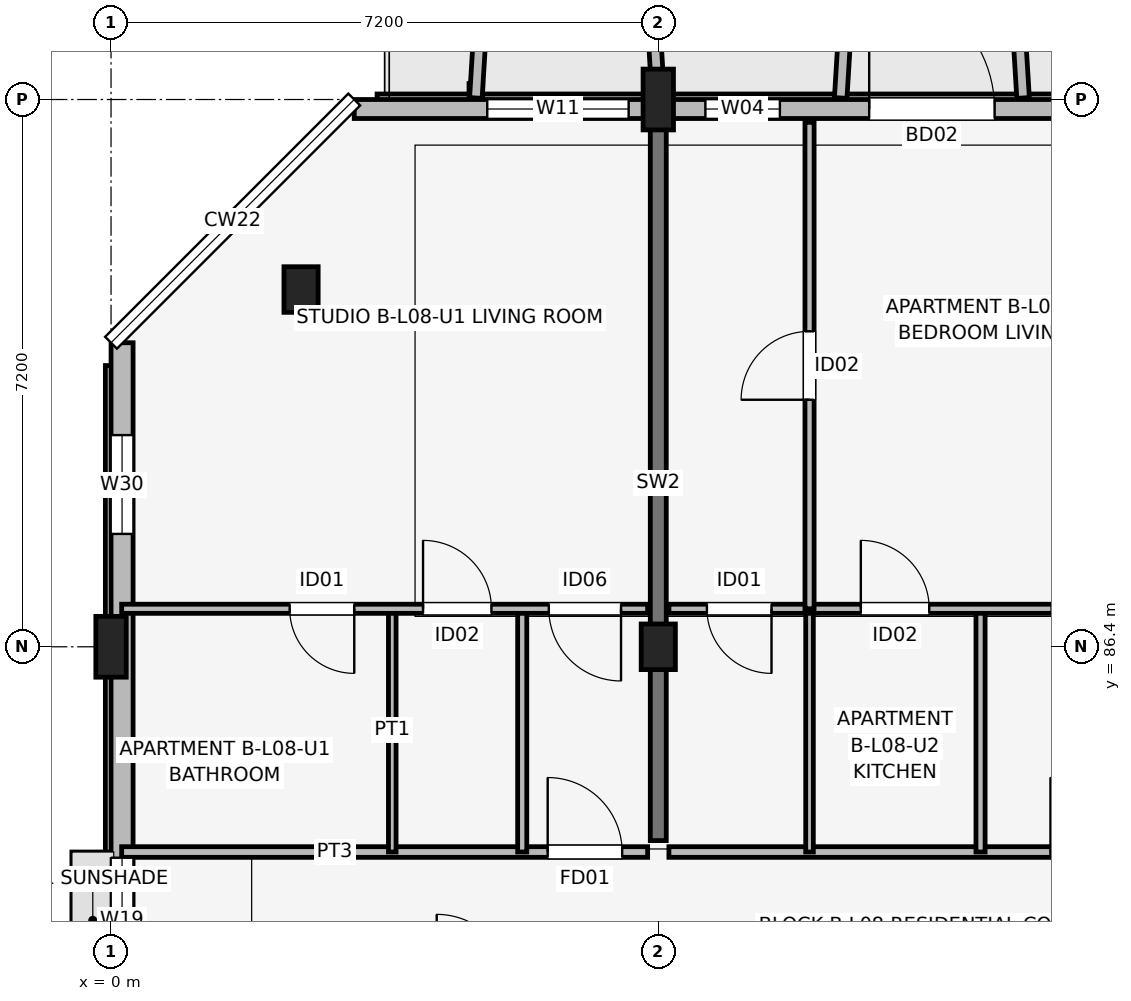
"""IFC4 building model, lengths in metres.
Left out: names, types, materials, properties, quantities, classifications, styles, units other than length and angle.
Written with IfcOpenShell. Run it as: python <this file> out.ifc"""

import sys

from ifc_helpers import new_model, si_unit, direction, frame, frame_2d, origin, origin_2d, place, context, subcontext, project, spatial, rectangle, extrude, element, fill, save


model = new_model("IFC4")
c1 = context("Model", 3, precision=1e-05, world=origin(), true_north=direction((0.0, 1.0)))
c2 = subcontext(c1, "Body", "Model", "MODEL_VIEW")
j1 = project(units=[si_unit("LENGTHUNIT", "METRE"), si_unit("PLANEANGLEUNIT", "RADIAN")], contexts=[c1])
p1 = place(None, origin())
s1 = spatial("IfcSite", under=j1, at=p1, CompositionType="ELEMENT")
p2 = place(p1, origin())
s2 = spatial("IfcBuilding", under=s1, at=p2, CompositionType="ELEMENT")
p3 = place(p2, frame((0.0, 0.0, 27.6)))
s3 = spatial("IfcBuildingStorey", under=s2, at=p3, CompositionType="ELEMENT", Elevation=27.6)
p4 = place(p3, frame((0.0, 86.4, 0.0), z_axis=(0.0, 0.0, 1.0), x_axis=(1.0, 0.0, 0.0)))
e1 = element("IfcColumn", 1, at=p4, inside=s3, PredefinedType="COLUMN", context=c2, shape_type="SweptSolid", body=[
    extrude(rectangle(XDim=0.4, YDim=0.8, at=origin_2d()), origin(), (0.0, 0.0, 1.0), 3.15),
])
for number, where, z_axis, x_axis in (
    (2, (2.5, 91.1, 0.0), (0.0, 0.0, 1.0), (1.0, 0.0, 0.0)),
    (3, (7.2, 86.4, 0.0), (0.0, 0.0, 1.0), (1.0, 0.0, 0.0)),
):
    element("IfcColumn", number, at=place(p3, frame(where, z_axis=z_axis, x_axis=x_axis)), inside=s3, PredefinedType="COLUMN", context=c2, shape_type="SweptSolid", body=[
        extrude(rectangle(XDim=0.45, YDim=0.6, at=origin_2d()), origin(), (0.0, 0.0, 1.0), 3.15),
    ])
p5 = place(p3, frame((7.2, 93.6, 0.0), z_axis=(0.0, 0.0, 1.0), x_axis=(1.0, 0.0, 0.0)))
e4 = element("IfcColumn", 4, at=p5, inside=s3, PredefinedType="COLUMN", context=c2, shape_type="SweptSolid", body=[
    extrude(rectangle(XDim=0.4, YDim=0.8, at=origin_2d()), origin(), (0.0, 0.0, 1.0), 3.15),
])
p6 = place(p3, frame((7.2, 83.85, 0.0), z_axis=(0.0, 0.0, 1.0), x_axis=(0.0, 1.0, 0.0)))
e5 = element("IfcWall", 5, at=p6, inside=s3, PredefinedType="SHEAR", context=c2, shape_type="SweptSolid", body=[
    extrude(rectangle(XDim=9.4, YDim=0.21, at=frame_2d((4.7, 0.0))), origin(), (0.0, 0.0, 1.0), 3.15),
])
p7 = place(p3, frame((32.8, 93.475, 0.0), z_axis=(0.0, 0.0, 1.0), x_axis=(-1.0, 0.0, 0.0)))
e6 = element("IfcWall", 6, at=p7, inside=s3, PredefinedType="SOLIDWALL", context=c2, shape_type="SweptSolid", body=[
    extrude(rectangle(XDim=29.6, YDim=0.25, at=frame_2d((14.8, 0.0))), origin(), (0.0, 0.0, 1.0), 2.43),
])
p8 = place(p7, frame((22.825, 0.0, 0.0), z_axis=(0.0, 0.0, 1.0), x_axis=(-1.0, 0.0, 0.0)))
e7 = element("IfcOpeningElement", 7, at=p8, cuts=e6, PredefinedType="OPENING", context=c2, shape_type="SweptSolid", body=[
    extrude(rectangle(XDim=1.65, YDim=2.15, at=frame_2d((0.825, 1.075))), frame((0.0, 0.135, 0.0), z_axis=(0.0, -1.0, 0.0), x_axis=(1.0, 0.0, 0.0)), (0.0, 0.0, 1.0), 0.27),
])
p9 = place(p7, frame((8.35, 0.0, 0.0), z_axis=(0.0, 0.0, 1.0), x_axis=(-1.0, 0.0, 0.0)))
e8 = element("IfcOpeningElement", 8, at=p9, cuts=e6, PredefinedType="OPENING", context=c2, shape_type="SweptSolid", body=[
    extrude(rectangle(XDim=1.5, YDim=2.15, at=frame_2d((0.75, 1.075))), frame((0.0, 0.135, 0.0), z_axis=(0.0, -1.0, 0.0), x_axis=(1.0, 0.0, 0.0)), (0.0, 0.0, 1.0), 0.27),
])
p10 = place(p7, frame((25.99, 0.0, 0.7)))
e9 = element("IfcOpeningElement", 9, at=p10, cuts=e6, PredefinedType="OPENING", context=c2, shape_type="SweptSolid", body=[
    extrude(rectangle(XDim=1.86, YDim=1.6, at=frame_2d((0.93, 0.8))), frame((0.0, 0.135, 0.0), z_axis=(0.0, -1.0, 0.0), x_axis=(1.0, 0.0, 0.0)), (0.0, 0.0, 1.0), 0.27),
])
p11 = place(p7, frame((24.0, 0.0, 0.75)))
e10 = element("IfcOpeningElement", 10, at=p11, cuts=e6, PredefinedType="OPENING", context=c2, shape_type="SweptSolid", body=[
    extrude(rectangle(XDim=0.98, YDim=1.45, at=frame_2d((0.49, 0.725))), frame((0.0, 0.135, 0.0), z_axis=(0.0, -1.0, 0.0), x_axis=(1.0, 0.0, 0.0)), (0.0, 0.0, 1.0), 0.27),
])
p12 = place(p7, frame((16.15, 0.0, 0.7)))
e11 = element("IfcOpeningElement", 11, at=p12, cuts=e6, PredefinedType="OPENING", context=c2, shape_type="SweptSolid", body=[
    extrude(rectangle(XDim=1.86, YDim=1.6, at=frame_2d((0.93, 0.8))), frame((0.0, 0.135, 0.0), z_axis=(0.0, -1.0, 0.0), x_axis=(1.0, 0.0, 0.0)), (0.0, 0.0, 1.0), 0.27),
])
p13 = place(p7, frame((11.91, 0.0, 0.75)))
e12 = element("IfcOpeningElement", 12, at=p13, cuts=e6, PredefinedType="OPENING", context=c2, shape_type="SweptSolid", body=[
    extrude(rectangle(XDim=1.22, YDim=1.5, at=frame_2d((0.61, 0.75))), frame((0.0, 0.135, 0.0), z_axis=(0.0, -1.0, 0.0), x_axis=(1.0, 0.0, 0.0)), (0.0, 0.0, 1.0), 0.27),
])
p14 = place(p7, frame((9.42, 0.0, 0.75)))
e13 = element("IfcOpeningElement", 13, at=p14, cuts=e6, PredefinedType="OPENING", context=c2, shape_type="SweptSolid", body=[
    extrude(rectangle(XDim=1.34, YDim=1.55, at=frame_2d((0.67, 0.775))), frame((0.0, 0.135, 0.0), z_axis=(0.0, -1.0, 0.0), x_axis=(1.0, 0.0, 0.0)), (0.0, 0.0, 1.0), 0.27),
])
p15 = place(p7, frame((2.16, 0.0, 0.75)))
e14 = element("IfcOpeningElement", 14, at=p15, cuts=e6, PredefinedType="OPENING", context=c2, shape_type="SweptSolid", body=[
    extrude(rectangle(XDim=1.46, YDim=1.55, at=frame_2d((0.73, 0.775))), frame((0.0, 0.135, 0.0), z_axis=(0.0, -1.0, 0.0), x_axis=(1.0, 0.0, 0.0)), (0.0, 0.0, 1.0), 0.27),
])
p16 = place(p7, frame((0.585, 0.0, 0.75)))
e15 = element("IfcOpeningElement", 15, at=p16, cuts=e6, PredefinedType="OPENING", context=c2, shape_type="SweptSolid", body=[
    extrude(rectangle(XDim=0.6, YDim=1.25, at=frame_2d((0.3, 0.625))), frame((0.0, 0.135, 0.0), z_axis=(0.0, -1.0, 0.0), x_axis=(1.0, 0.0, 0.0)), (0.0, 0.0, 1.0), 0.27),
])
p17 = place(p3, frame((0.145, 90.4, 0.0), z_axis=(0.0, 0.0, 1.0), x_axis=(0.0, -1.0, 0.0)))
e16 = element("IfcWall", 16, at=p17, inside=s3, PredefinedType="SOLIDWALL", context=c2, shape_type="SweptSolid", body=[
    extrude(rectangle(XDim=15.2, YDim=0.29, at=frame_2d((7.6, 0.0))), origin(), (0.0, 0.0, 1.0), 2.43),
])
p18 = place(p17, frame((6.775, 0.0, 1.05)))
e17 = element("IfcOpeningElement", 17, at=p18, cuts=e16, PredefinedType="OPENING", context=c2, shape_type="SweptSolid", body=[
    extrude(rectangle(XDim=1.65, YDim=1.15, at=frame_2d((0.825, 0.575))), frame((0.0, 0.155, 0.0), z_axis=(0.0, -1.0, 0.0), x_axis=(1.0, 0.0, 0.0)), (0.0, 0.0, 1.0), 0.31),
])
p19 = place(p17, frame((1.215, 0.0, 0.75)))
e18 = element("IfcOpeningElement", 18, at=p19, cuts=e16, PredefinedType="OPENING", context=c2, shape_type="SweptSolid", body=[
    extrude(rectangle(XDim=1.3, YDim=1.55, at=frame_2d((0.65, 0.775))), frame((0.0, 0.155, 0.0), z_axis=(0.0, -1.0, 0.0), x_axis=(1.0, 0.0, 0.0)), (0.0, 0.0, 1.0), 0.31),
])
for number, where, z_axis, x_axis in (
    (19, (4.8, 93.62, 0.0), (0.0, 0.0, 1.0), (0.061, 0.998, 0.0)),
    (20, (7.2, 93.62, 0.0), (0.0, 0.0, 1.0), (-0.061, 0.998, 0.0)),
):
    element("IfcWall", number, at=place(p3, frame(where, z_axis=z_axis, x_axis=x_axis)), inside=s3, PredefinedType="ELEMENTEDWALL", context=c2, shape_type="SweptSolid", body=[
        extrude(rectangle(XDim=1.964, YDim=0.165, at=frame_2d((0.982, 0.0))), origin(), (0.0, 0.0, 1.0), 2.95),
    ])
for number, where, z_axis, x_axis in (
    (21, (9.6, 93.62, 0.0), (0.0, 0.0, 1.0), (0.061, 0.998, 0.0)),
    (22, (12.0, 93.62, 0.0), (0.0, 0.0, 1.0), (-0.061, 0.998, 0.0)),
):
    element("IfcWall", number, at=place(p3, frame(where, z_axis=z_axis, x_axis=x_axis)), inside=s3, PredefinedType="ELEMENTEDWALL", context=c2, shape_type="SweptSolid", body=[
        extrude(rectangle(XDim=1.964, YDim=0.165, at=frame_2d((0.982, 0.0))), origin(), (0.0, 0.0, 1.0), 2.55),
    ])
p20 = place(p3, frame((0.14, 83.7, 0.0), z_axis=(0.0, 0.0, 1.0), x_axis=(1.0, 0.0, 0.0)))
e23 = element("IfcWall", 23, at=p20, inside=s3, PredefinedType="PARTITIONING", context=c2, shape_type="SweptSolid", body=[
    extrude(rectangle(XDim=6.92, YDim=0.14, at=frame_2d((3.46, 0.0))), origin(), (0.0, 0.0, 1.0), 2.38),
])
p21 = place(p20, frame((5.605, 0.0, 0.0)))
e24 = element("IfcOpeningElement", 24, at=p21, cuts=e23, PredefinedType="OPENING", context=c2, shape_type="SweptSolid", body=[
    extrude(rectangle(XDim=0.98, YDim=2.1, at=frame_2d((0.49, 1.05))), frame((0.0, 0.08, 0.0), z_axis=(0.0, -1.0, 0.0), x_axis=(1.0, 0.0, 0.0)), (0.0, 0.0, 1.0), 0.16),
])
p22 = place(p3, frame((3.7, 83.7, 0.0), z_axis=(0.0, 0.0, 1.0), x_axis=(0.0, 1.0, 0.0)))
e25 = element("IfcWall", 25, at=p22, inside=s3, PredefinedType="PARTITIONING", context=c2, shape_type="SweptSolid", body=[
    extrude(rectangle(XDim=3.2, YDim=0.1, at=frame_2d((1.6, 0.0))), origin(), (0.0, 0.0, 1.0), 2.38),
])
p23 = place(p3, frame((5.41, 83.7, 0.0), z_axis=(0.0, 0.0, 1.0), x_axis=(0.0, 1.0, 0.0)))
e26 = element("IfcWall", 26, at=p23, inside=s3, PredefinedType="PARTITIONING", context=c2, shape_type="SweptSolid", body=[
    extrude(rectangle(XDim=3.2, YDim=0.12, at=frame_2d((1.6, 0.0))), origin(), (0.0, 0.0, 1.0), 2.38),
])
p24 = place(p3, frame((0.14, 86.9, 0.0), z_axis=(0.0, 0.0, 1.0), x_axis=(1.0, 0.0, 0.0)))
e27 = element("IfcWall", 27, at=p24, inside=s3, PredefinedType="PARTITIONING", context=c2, shape_type="SweptSolid", body=[
    extrude(rectangle(XDim=6.92, YDim=0.12, at=frame_2d((3.46, 0.0))), origin(), (0.0, 0.0, 1.0), 2.38),
])
p25 = place(p24, frame((3.06, 0.0, 0.0), z_axis=(0.0, 0.0, 1.0), x_axis=(-1.0, 0.0, 0.0)))
e28 = element("IfcOpeningElement", 28, at=p25, cuts=e27, PredefinedType="OPENING", context=c2, shape_type="SweptSolid", body=[
    extrude(rectangle(XDim=0.85, YDim=2.08, at=frame_2d((0.425, 1.04))), frame((0.0, 0.07, 0.0), z_axis=(0.0, -1.0, 0.0), x_axis=(1.0, 0.0, 0.0)), (0.0, 0.0, 1.0), 0.14),
])
p26 = place(p24, frame((3.965, 0.0, 0.0)))
e29 = element("IfcOpeningElement", 29, at=p26, cuts=e27, PredefinedType="OPENING", context=c2, shape_type="SweptSolid", body=[
    extrude(rectangle(XDim=0.9, YDim=2.08, at=frame_2d((0.45, 1.04))), frame((0.0, 0.07, 0.0), z_axis=(0.0, -1.0, 0.0), x_axis=(1.0, 0.0, 0.0)), (0.0, 0.0, 1.0), 0.14),
])
p27 = place(p24, frame((6.57, 0.0, 0.0), z_axis=(0.0, 0.0, 1.0), x_axis=(-1.0, 0.0, 0.0)))
e30 = element("IfcOpeningElement", 30, at=p27, cuts=e27, PredefinedType="OPENING", context=c2, shape_type="SweptSolid", body=[
    extrude(rectangle(XDim=0.95, YDim=2.08, at=frame_2d((0.475, 1.04))), frame((0.0, 0.07, 0.0), z_axis=(0.0, -1.0, 0.0), x_axis=(1.0, 0.0, 0.0)), (0.0, 0.0, 1.0), 0.14),
])
p28 = place(p3, frame((7.34, 83.7, 0.0), z_axis=(0.0, 0.0, 1.0), x_axis=(1.0, 0.0, 0.0)))
e31 = element("IfcWall", 31, at=p28, inside=s3, PredefinedType="PARTITIONING", context=c2, shape_type="SweptSolid", body=[
    extrude(rectangle(XDim=6.92, YDim=0.14, at=frame_2d((3.46, 0.0))), origin(), (0.0, 0.0, 1.0), 2.38),
])
p29 = place(p28, frame((5.02, 0.0, 0.0)))
e32 = element("IfcOpeningElement", 32, at=p29, cuts=e31, PredefinedType="OPENING", context=c2, shape_type="SweptSolid", body=[
    extrude(rectangle(XDim=0.98, YDim=2.1, at=frame_2d((0.49, 1.05))), frame((0.0, 0.08, 0.0), z_axis=(0.0, -1.0, 0.0), x_axis=(1.0, 0.0, 0.0)), (0.0, 0.0, 1.0), 0.16),
])
p30 = place(p3, frame((9.19, 83.7, 0.0), z_axis=(0.0, 0.0, 1.0), x_axis=(0.0, 1.0, 0.0)))
e33 = element("IfcWall", 33, at=p30, inside=s3, PredefinedType="PARTITIONING", context=c2, shape_type="SweptSolid", body=[
    extrude(rectangle(XDim=3.2, YDim=0.1, at=frame_2d((1.6, 0.0))), origin(), (0.0, 0.0, 1.0), 2.38),
])
p31 = place(p3, frame((11.44, 83.7, 0.0), z_axis=(0.0, 0.0, 1.0), x_axis=(0.0, 1.0, 0.0)))
e34 = element("IfcWall", 34, at=p31, inside=s3, PredefinedType="PARTITIONING", context=c2, shape_type="SweptSolid", body=[
    extrude(rectangle(XDim=3.2, YDim=0.12, at=frame_2d((1.6, 0.0))), origin(), (0.0, 0.0, 1.0), 2.38),
])
p32 = place(p3, frame((7.34, 86.9, 0.0), z_axis=(0.0, 0.0, 1.0), x_axis=(1.0, 0.0, 0.0)))
e35 = element("IfcWall", 35, at=p32, inside=s3, PredefinedType="PARTITIONING", context=c2, shape_type="SweptSolid", body=[
    extrude(rectangle(XDim=6.92, YDim=0.12, at=frame_2d((3.46, 0.0))), origin(), (0.0, 0.0, 1.0), 2.38),
])
p33 = place(p32, frame((1.35, 0.0, 0.0), z_axis=(0.0, 0.0, 1.0), x_axis=(-1.0, 0.0, 0.0)))
e36 = element("IfcOpeningElement", 36, at=p33, cuts=e35, PredefinedType="OPENING", context=c2, shape_type="SweptSolid", body=[
    extrude(rectangle(XDim=0.85, YDim=2.08, at=frame_2d((0.425, 1.04))), frame((0.0, 0.07, 0.0), z_axis=(0.0, -1.0, 0.0), x_axis=(1.0, 0.0, 0.0)), (0.0, 0.0, 1.0), 0.14),
])
p34 = place(p32, frame((2.525, 0.0, 0.0)))
e37 = element("IfcOpeningElement", 37, at=p34, cuts=e35, PredefinedType="OPENING", context=c2, shape_type="SweptSolid", body=[
    extrude(rectangle(XDim=0.9, YDim=2.08, at=frame_2d((0.45, 1.04))), frame((0.0, 0.07, 0.0), z_axis=(0.0, -1.0, 0.0), x_axis=(1.0, 0.0, 0.0)), (0.0, 0.0, 1.0), 0.14),
])
p35 = place(p32, frame((5.985, 0.0, 0.0), z_axis=(0.0, 0.0, 1.0), x_axis=(-1.0, 0.0, 0.0)))
e38 = element("IfcOpeningElement", 38, at=p35, cuts=e35, PredefinedType="OPENING", context=c2, shape_type="SweptSolid", body=[
    extrude(rectangle(XDim=0.95, YDim=2.08, at=frame_2d((0.475, 1.04))), frame((0.0, 0.07, 0.0), z_axis=(0.0, -1.0, 0.0), x_axis=(1.0, 0.0, 0.0)), (0.0, 0.0, 1.0), 0.14),
])
p36 = place(p3, frame((9.19, 86.9, 0.0), z_axis=(0.0, 0.0, 1.0), x_axis=(0.0, 1.0, 0.0)))
e39 = element("IfcWall", 39, at=p36, inside=s3, PredefinedType="PARTITIONING", context=c2, shape_type="SweptSolid", body=[
    extrude(rectangle(XDim=6.4, YDim=0.12, at=frame_2d((3.2, 0.0))), origin(), (0.0, 0.0, 1.0), 2.38),
])
p37 = place(p36, frame((2.75, 0.0, 0.0)))
e40 = element("IfcOpeningElement", 40, at=p37, cuts=e39, PredefinedType="OPENING", context=c2, shape_type="SweptSolid", body=[
    extrude(rectangle(XDim=0.9, YDim=2.08, at=frame_2d((0.45, 1.04))), frame((0.0, 0.07, 0.0), z_axis=(0.0, -1.0, 0.0), x_axis=(1.0, 0.0, 0.0)), (0.0, 0.0, 1.0), 0.14),
])
p38 = place(p8, origin())
e41 = element("IfcDoor", 41, at=p38, inside=s3, OperationType="SINGLE_SWING_RIGHT", PredefinedType="DOOR", context=c2, shape_type="SweptSolid", body=[
    extrude(rectangle(XDim=1.65, YDim=2.15, at=frame_2d((0.825, 1.075))), frame((0.0, 0.025, 0.0), z_axis=(0.0, -1.0, 0.0), x_axis=(1.0, 0.0, 0.0)), (0.0, 0.0, 1.0), 0.05),
])
fill(e7, e41)
p39 = place(p10, origin())
e42 = element("IfcWindow", 42, at=p39, inside=s3, PartitioningType="SINGLE_PANEL", PredefinedType="WINDOW", context=c2, shape_type="SweptSolid", body=[
    extrude(rectangle(XDim=1.86, YDim=1.6, at=frame_2d((0.93, 0.8))), frame((0.0, 0.03, 0.0), z_axis=(0.0, -1.0, 0.0), x_axis=(1.0, 0.0, 0.0)), (0.0, 0.0, 1.0), 0.06),
])
fill(e9, e42)
p40 = place(p11, origin())
e43 = element("IfcWindow", 43, at=p40, inside=s3, PartitioningType="SINGLE_PANEL", PredefinedType="WINDOW", context=c2, shape_type="SweptSolid", body=[
    extrude(rectangle(XDim=0.98, YDim=1.45, at=frame_2d((0.49, 0.725))), frame((0.0, 0.03, 0.0), z_axis=(0.0, -1.0, 0.0), x_axis=(1.0, 0.0, 0.0)), (0.0, 0.0, 1.0), 0.06),
])
fill(e10, e43)
p41 = place(p18, origin())
e44 = element("IfcWindow", 44, at=p41, inside=s3, PartitioningType="SINGLE_PANEL", PredefinedType="WINDOW", context=c2, shape_type="SweptSolid", body=[
    extrude(rectangle(XDim=1.65, YDim=1.15, at=frame_2d((0.825, 0.575))), frame((0.0, 0.03, 0.0), z_axis=(0.0, -1.0, 0.0), x_axis=(1.0, 0.0, 0.0)), (0.0, 0.0, 1.0), 0.06),
])
fill(e17, e44)
p42 = place(p19, origin())
e45 = element("IfcWindow", 45, at=p42, inside=s3, PartitioningType="SINGLE_PANEL", PredefinedType="WINDOW", context=c2, shape_type="SweptSolid", body=[
    extrude(rectangle(XDim=1.3, YDim=1.55, at=frame_2d((0.65, 0.775))), frame((0.0, 0.03, 0.0), z_axis=(0.0, -1.0, 0.0), x_axis=(1.0, 0.0, 0.0)), (0.0, 0.0, 1.0), 0.06),
])
fill(e18, e45)
p43 = place(p21, origin())
e46 = element("IfcDoor", 46, at=p43, inside=s3, OperationType="SINGLE_SWING_LEFT", PredefinedType="DOOR", context=c2, shape_type="SweptSolid", body=[
    extrude(rectangle(XDim=0.98, YDim=2.1, at=frame_2d((0.49, 1.05))), frame((0.0, 0.025, 0.0), z_axis=(0.0, -1.0, 0.0), x_axis=(1.0, 0.0, 0.0)), (0.0, 0.0, 1.0), 0.05),
])
fill(e24, e46)
p44 = place(p25, origin())
e47 = element("IfcDoor", 47, at=p44, inside=s3, OperationType="SINGLE_SWING_RIGHT", PredefinedType="DOOR", context=c2, shape_type="SweptSolid", body=[
    extrude(rectangle(XDim=0.85, YDim=2.08, at=frame_2d((0.425, 1.04))), frame((0.0, 0.025, 0.0), z_axis=(0.0, -1.0, 0.0), x_axis=(1.0, 0.0, 0.0)), (0.0, 0.0, 1.0), 0.05),
])
fill(e28, e47)
p45 = place(p26, origin())
e48 = element("IfcDoor", 48, at=p45, inside=s3, OperationType="SINGLE_SWING_LEFT", PredefinedType="DOOR", context=c2, shape_type="SweptSolid", body=[
    extrude(rectangle(XDim=0.9, YDim=2.08, at=frame_2d((0.45, 1.04))), frame((0.0, 0.025, 0.0), z_axis=(0.0, -1.0, 0.0), x_axis=(1.0, 0.0, 0.0)), (0.0, 0.0, 1.0), 0.05),
])
fill(e29, e48)
p46 = place(p27, origin())
e49 = element("IfcDoor", 49, at=p46, inside=s3, OperationType="SINGLE_SWING_RIGHT", PredefinedType="DOOR", context=c2, shape_type="SweptSolid", body=[
    extrude(rectangle(XDim=0.95, YDim=2.08, at=frame_2d((0.475, 1.04))), frame((0.0, 0.025, 0.0), z_axis=(0.0, -1.0, 0.0), x_axis=(1.0, 0.0, 0.0)), (0.0, 0.0, 1.0), 0.05),
])
fill(e30, e49)
p47 = place(p33, origin())
e50 = element("IfcDoor", 50, at=p47, inside=s3, OperationType="SINGLE_SWING_RIGHT", PredefinedType="DOOR", context=c2, shape_type="SweptSolid", body=[
    extrude(rectangle(XDim=0.85, YDim=2.08, at=frame_2d((0.425, 1.04))), frame((0.0, 0.025, 0.0), z_axis=(0.0, -1.0, 0.0), x_axis=(1.0, 0.0, 0.0)), (0.0, 0.0, 1.0), 0.05),
])
fill(e36, e50)
p48 = place(p34, origin())
e51 = element("IfcDoor", 51, at=p48, inside=s3, OperationType="SINGLE_SWING_LEFT", PredefinedType="DOOR", context=c2, shape_type="SweptSolid", body=[
    extrude(rectangle(XDim=0.9, YDim=2.08, at=frame_2d((0.45, 1.04))), frame((0.0, 0.025, 0.0), z_axis=(0.0, -1.0, 0.0), x_axis=(1.0, 0.0, 0.0)), (0.0, 0.0, 1.0), 0.05),
])
fill(e37, e51)
p49 = place(p37, origin())
e52 = element("IfcDoor", 52, at=p49, inside=s3, OperationType="SINGLE_SWING_LEFT", PredefinedType="DOOR", context=c2, shape_type="SweptSolid", body=[
    extrude(rectangle(XDim=0.9, YDim=2.08, at=frame_2d((0.45, 1.04))), frame((0.0, 0.025, 0.0), z_axis=(0.0, -1.0, 0.0), x_axis=(1.0, 0.0, 0.0)), (0.0, 0.0, 1.0), 0.05),
])
fill(e40, e52)
save(model, sys.argv[1])
